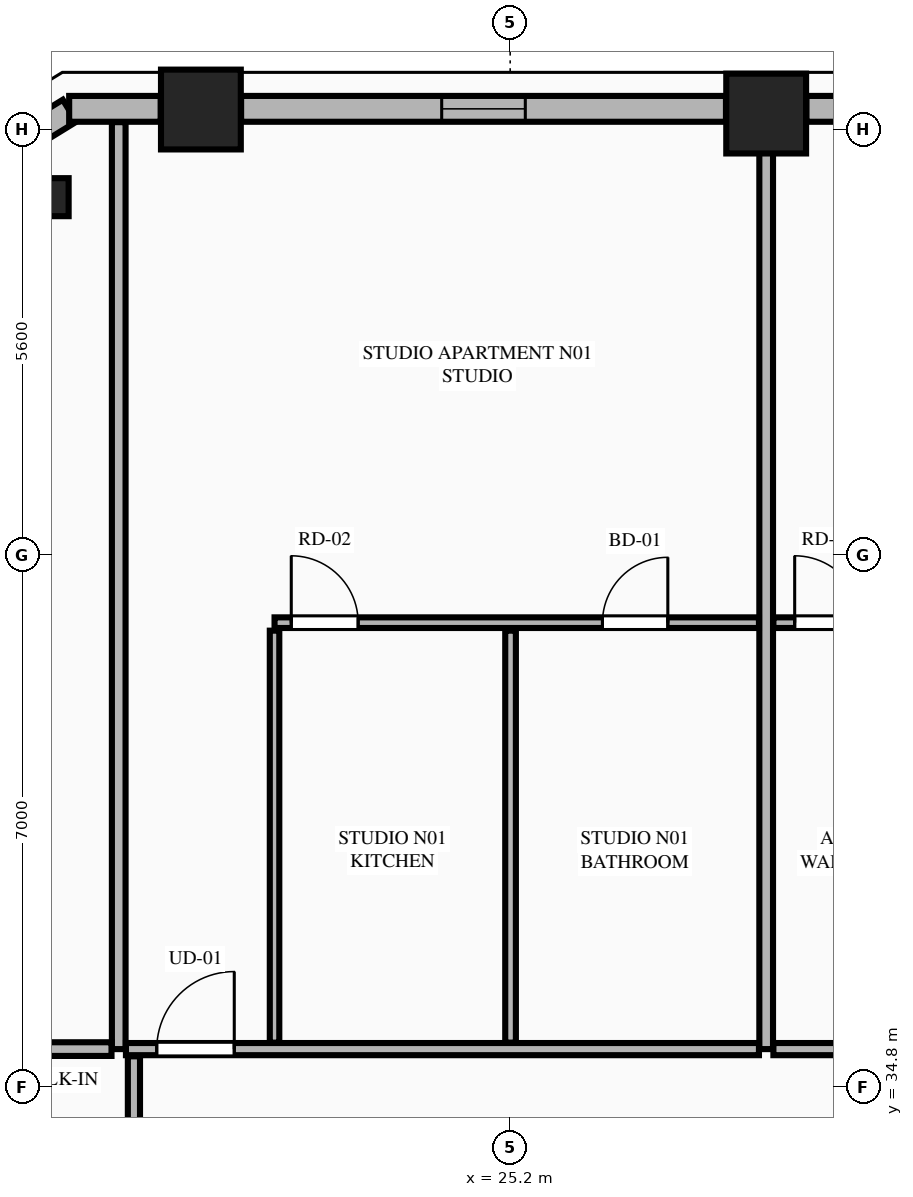
"""IFC4 building model, lengths in metres.
Left out: names, types, materials, properties, quantities, classifications, styles, units other than length and angle.
Written with IfcOpenShell. Run it as: python <this file> out.ifc"""

import sys

from ifc_helpers import new_model, si_unit, direction, frame, frame_2d, origin, origin_2d, place, context, subcontext, project, spatial, rectangle, extrude, element, fill, save


model = new_model("IFC4")
c1 = context("Model", 3, precision=1e-05, world=origin(), true_north=direction((0.0, 1.0)))
c2 = subcontext(c1, "Body", "Model", "MODEL_VIEW")
j1 = project(units=[si_unit("LENGTHUNIT", "METRE"), si_unit("PLANEANGLEUNIT", "RADIAN")], contexts=[c1])
p1 = place(None, origin())
s1 = spatial("IfcSite", under=j1, at=p1, CompositionType="ELEMENT")
p2 = place(p1, origin())
s2 = spatial("IfcBuilding", under=s1, at=p2, CompositionType="ELEMENT")
p3 = place(p2, frame((0.0, 0.0, 101.95)))
s3 = spatial("IfcBuildingStorey", under=s2, at=p3, CompositionType="ELEMENT", Elevation=101.95)
for number, where, z_axis, x_axis in (
    (1, (28.568, 47.608, 0.0), (0.0, 0.0, 1.0), (1.0, 0.0, 0.0)),
    (2, (21.131, 47.661, 0.0), (0.0, 0.0, 1.0), (1.0, 0.0, 0.0)),
):
    element("IfcColumn", number, at=place(p3, frame(where, z_axis=z_axis, x_axis=x_axis)), inside=s3, PredefinedType="COLUMN", context=c2, shape_type="SweptSolid", body=[
        extrude(rectangle(XDim=1.05, YDim=1.05, at=origin_2d()), origin(), (0.0, 0.0, 1.0), 3.55),
    ])
p4 = place(p3, frame((19.141, 46.508, 0.0), z_axis=(0.0, 0.0, 1.0), x_axis=(-0.865160173452, -0.501495637342, 0.0)))
e3 = element("IfcColumn", 3, at=p4, inside=s3, PredefinedType="PILASTER", context=c2, shape_type="SweptSolid", body=[
    extrude(rectangle(XDim=0.5, YDim=0.35, at=origin_2d()), origin(), (0.0, 0.0, 1.0), 3.55),
])
p5 = place(p3, frame((19.403, 47.645, 0.0), z_axis=(0.0, 0.0, 1.0), x_axis=(-0.851798915137, -0.523868884523, 0.0)))
e4 = element("IfcWall", 4, at=p5, inside=s3, PredefinedType="STANDARD", context=c2, shape_type="SweptSolid", body=[
    extrude(rectangle(XDim=1.848, YDim=0.34, at=frame_2d((0.924, 0.0))), origin(), (0.0, 0.0, 1.0), 3.34),
])
p6 = place(p3, frame((35.703, 47.67, 0.0), z_axis=(0.0, 0.0, 1.0), x_axis=(-1.0, 0.0, 0.0)))
e5 = element("IfcWall", 5, at=p6, inside=s3, PredefinedType="STANDARD", context=c2, shape_type="SweptSolid", body=[
    extrude(rectangle(XDim=6.606, YDim=0.34, at=frame_2d((3.303, 0.0))), origin(), (0.0, 0.0, 1.0), 2.797),
])
p7 = place(p6, frame((0.22, 0.0, 0.75)))
e6 = element("IfcOpeningElement", 6, at=p7, cuts=e5, PredefinedType="OPENING", context=c2, shape_type="SweptSolid", body=[
    extrude(rectangle(XDim=1.04, YDim=1.897, at=frame_2d((0.52, 0.948))), frame((0.0, 0.18, 0.0), z_axis=(0.0, -1.0, 0.0), x_axis=(1.0, 0.0, 0.0)), (0.0, 0.0, 1.0), 0.36),
])
p8 = place(p6, frame((3.605, 0.0, 0.75)))
e7 = element("IfcOpeningElement", 7, at=p8, cuts=e5, PredefinedType="OPENING", context=c2, shape_type="SweptSolid", body=[
    extrude(rectangle(XDim=1.1, YDim=1.897, at=frame_2d((0.55, 0.948))), frame((0.0, 0.18, 0.0), z_axis=(0.0, -1.0, 0.0), x_axis=(1.0, 0.0, 0.0)), (0.0, 0.0, 1.0), 0.36),
])
p9 = place(p3, frame((28.039, 47.67, 0.0), z_axis=(0.0, 0.0, 1.0), x_axis=(-1.0, 0.0, 0.0)))
e8 = element("IfcWall", 8, at=p9, inside=s3, PredefinedType="STANDARD", context=c2, shape_type="SweptSolid", body=[
    extrude(rectangle(XDim=6.379, YDim=0.34, at=frame_2d((3.189, 0.0))), origin(), (0.0, 0.0, 1.0), 2.797),
])
p10 = place(p9, frame((2.64, 0.0, 0.75)))
e9 = element("IfcOpeningElement", 9, at=p10, cuts=e8, PredefinedType="OPENING", context=c2, shape_type="SweptSolid", body=[
    extrude(rectangle(XDim=1.1, YDim=1.897, at=frame_2d((0.55, 0.948))), frame((0.0, 0.18, 0.0), z_axis=(0.0, -1.0, 0.0), x_axis=(1.0, 0.0, 0.0)), (0.0, 0.0, 1.0), 0.36),
])
p11 = place(p3, frame((20.602, 47.67, 0.0), z_axis=(0.0, 0.0, 1.0), x_axis=(-1.0, 0.0, 0.0)))
e10 = element("IfcWall", 10, at=p11, inside=s3, PredefinedType="STANDARD", context=c2, shape_type="SweptSolid", body=[
    extrude(rectangle(XDim=1.204, YDim=0.34, at=frame_2d((0.602, 0.0))), origin(), (0.0, 0.0, 1.0), 3.34),
])
p12 = place(p3, frame((20.05, 35.3, 0.0), z_axis=(0.0, 0.0, 1.0), x_axis=(0.0, 1.0, 0.0)))
e11 = element("IfcWall", 11, at=p12, inside=s3, PredefinedType="PARTITIONING", context=c2, shape_type="SweptSolid", body=[
    extrude(rectangle(XDim=12.195, YDim=0.18, at=frame_2d((6.098, 0.0))), origin(), (0.0, 0.0, 1.0), 3.34),
])
p13 = place(p3, frame((28.568, 35.3, 0.0), z_axis=(0.0, 0.0, 1.0), x_axis=(0.0, 1.0, 0.0)))
e12 = element("IfcWall", 12, at=p13, inside=s3, PredefinedType="PARTITIONING", context=c2, shape_type="SweptSolid", body=[
    extrude(rectangle(XDim=12.195, YDim=0.18, at=frame_2d((6.098, 0.0))), origin(), (0.0, 0.0, 1.0), 2.722),
])
p14 = place(p3, frame((20.145, 35.3, 0.0), z_axis=(0.0, 0.0, 1.0), x_axis=(1.0, 0.0, 0.0)))
e13 = element("IfcWall", 13, at=p14, inside=s3, PredefinedType="PARTITIONING", context=c2, shape_type="SweptSolid", body=[
    extrude(rectangle(XDim=8.328, YDim=0.16, at=frame_2d((4.164, 0.0))), origin(), (0.0, 0.0, 1.0), 3.34),
])
p15 = place(p14, frame((0.405, 0.0, 0.0)))
e14 = element("IfcOpeningElement", 14, at=p15, cuts=e13, PredefinedType="OPENING", context=c2, shape_type="SweptSolid", body=[
    extrude(rectangle(XDim=1.02, YDim=2.25, at=frame_2d((0.51, 1.125))), frame((0.0, 0.09, 0.0), z_axis=(0.0, -1.0, 0.0), x_axis=(1.0, 0.0, 0.0)), (0.0, 0.0, 1.0), 0.18),
])
p16 = place(p3, frame((22.1, 35.385, 0.0), z_axis=(0.0, 0.0, 1.0), x_axis=(0.0, 1.0, 0.0)))
e15 = element("IfcWall", 15, at=p16, inside=s3, PredefinedType="PARTITIONING", context=c2, shape_type="SweptSolid", body=[
    extrude(rectangle(XDim=5.42, YDim=0.125, at=frame_2d((2.71, 0.0))), origin(), (0.0, 0.0, 1.0), 2.722),
])
p17 = place(p3, frame((22.1, 40.91, 0.0), z_axis=(0.0, 0.0, 1.0), x_axis=(1.0, 0.0, 0.0)))
e16 = element("IfcWall", 16, at=p17, inside=s3, PredefinedType="PLUMBINGWALL", context=c2, shape_type="SweptSolid", body=[
    extrude(rectangle(XDim=6.373, YDim=0.14, at=frame_2d((3.187, 0.0))), origin(), (0.0, 0.0, 1.0), 3.34),
])
p18 = place(p17, frame((4.314, 0.0, 0.0)))
e17 = element("IfcOpeningElement", 17, at=p18, cuts=e16, PredefinedType="OPENING", context=c2, shape_type="SweptSolid", body=[
    extrude(rectangle(XDim=0.86, YDim=2.1, at=frame_2d((0.43, 1.05))), frame((0.0, 0.08, 0.0), z_axis=(0.0, -1.0, 0.0), x_axis=(1.0, 0.0, 0.0)), (0.0, 0.0, 1.0), 0.16),
])
p19 = place(p17, frame((0.22, 0.0, 0.0)))
e18 = element("IfcOpeningElement", 18, at=p19, cuts=e16, PredefinedType="OPENING", context=c2, shape_type="SweptSolid", body=[
    extrude(rectangle(XDim=0.88, YDim=2.15, at=frame_2d((0.44, 1.075))), frame((0.0, 0.08, 0.0), z_axis=(0.0, -1.0, 0.0), x_axis=(1.0, 0.0, 0.0)), (0.0, 0.0, 1.0), 0.16),
])
p20 = place(p3, frame((25.205, 35.385, 0.0), z_axis=(0.0, 0.0, 1.0), x_axis=(0.0, 1.0, 0.0)))
e19 = element("IfcWall", 19, at=p20, inside=s3, PredefinedType="PLUMBINGWALL", context=c2, shape_type="SweptSolid", body=[
    extrude(rectangle(XDim=5.42, YDim=0.14, at=frame_2d((2.71, 0.0))), origin(), (0.0, 0.0, 1.0), 3.34),
])
p21 = place(p3, frame((28.663, 35.3, 0.0), z_axis=(0.0, 0.0, 1.0), x_axis=(1.0, 0.0, 0.0)))
e20 = element("IfcWall", 20, at=p21, inside=s3, PredefinedType="PARTITIONING", context=c2, shape_type="SweptSolid", body=[
    extrude(rectangle(XDim=15.992, YDim=0.16, at=frame_2d((7.996, 0.0))), origin(), (0.0, 0.0, 1.0), 3.34),
])
p22 = place(p21, frame((14.087, 0.0, 0.0)))
e21 = element("IfcOpeningElement", 21, at=p22, cuts=e20, PredefinedType="OPENING", context=c2, shape_type="SweptSolid", body=[
    extrude(rectangle(XDim=1.02, YDim=2.25, at=frame_2d((0.51, 1.125))), frame((0.0, 0.09, 0.0), z_axis=(0.0, -1.0, 0.0), x_axis=(1.0, 0.0, 0.0)), (0.0, 0.0, 1.0), 0.18),
])
p23 = place(p3, frame((28.663, 40.91, 0.0), z_axis=(0.0, 0.0, 1.0), x_axis=(1.0, 0.0, 0.0)))
e22 = element("IfcWall", 22, at=p23, inside=s3, PredefinedType="PLUMBINGWALL", context=c2, shape_type="SweptSolid", body=[
    extrude(rectangle(XDim=5.373, YDim=0.14, at=frame_2d((2.687, 0.0))), origin(), (0.0, 0.0, 1.0), 3.34),
])
p24 = place(p23, frame((0.28, 0.0, 0.0)))
e23 = element("IfcOpeningElement", 23, at=p24, cuts=e22, PredefinedType="OPENING", context=c2, shape_type="SweptSolid", body=[
    extrude(rectangle(XDim=0.88, YDim=2.15, at=frame_2d((0.44, 1.075))), frame((0.0, 0.08, 0.0), z_axis=(0.0, -1.0, 0.0), x_axis=(1.0, 0.0, 0.0)), (0.0, 0.0, 1.0), 0.16),
])
p25 = place(p23, frame((3.543, 0.0, 0.0)))
e24 = element("IfcOpeningElement", 24, at=p25, cuts=e22, PredefinedType="OPENING", context=c2, shape_type="SweptSolid", body=[
    extrude(rectangle(XDim=0.86, YDim=2.1, at=frame_2d((0.43, 1.05))), frame((0.0, 0.08, 0.0), z_axis=(0.0, -1.0, 0.0), x_axis=(1.0, 0.0, 0.0)), (0.0, 0.0, 1.0), 0.16),
])
p26 = place(p3, frame((12.286, 35.3, 0.0), z_axis=(0.0, 0.0, 1.0), x_axis=(1.0, 0.0, 0.0)))
e25 = element("IfcWall", 25, at=p26, inside=s3, PredefinedType="PARTITIONING", context=c2, shape_type="SweptSolid", body=[
    extrude(rectangle(XDim=7.669, YDim=0.18, at=frame_2d((3.834, 0.0))), origin(), (0.0, 0.0, 1.0), 3.34),
])
p27 = place(p3, frame((20.25, 16.595, 0.0), z_axis=(0.0, 0.0, 1.0), x_axis=(0.0, 1.0, 0.0)))
e26 = element("IfcWall", 26, at=p27, inside=s3, PredefinedType="PARTITIONING", context=c2, shape_type="SweptSolid", body=[
    extrude(rectangle(XDim=18.61, YDim=0.16, at=frame_2d((9.305, 0.0))), origin(), (0.0, 0.0, 1.0), 3.34),
])
p28 = place(p27, frame((0.45, 0.0, 0.0)))
e27 = element("IfcOpeningElement", 27, at=p28, cuts=e26, PredefinedType="OPENING", context=c2, shape_type="SweptSolid", body=[
    extrude(rectangle(XDim=1.02, YDim=2.25, at=frame_2d((0.51, 1.125))), frame((0.0, 0.09, 0.0), z_axis=(0.0, -1.0, 0.0), x_axis=(1.0, 0.0, 0.0)), (0.0, 0.0, 1.0), 0.18),
])
p29 = place(p10, origin())
e28 = element("IfcWindow", 28, at=p29, inside=s3, PartitioningType="SINGLE_PANEL", PredefinedType="WINDOW", context=c2, shape_type="SweptSolid", body=[
    extrude(rectangle(XDim=1.1, YDim=1.897, at=frame_2d((0.55, 0.948))), frame((0.0, 0.03, 0.0), z_axis=(0.0, -1.0, 0.0), x_axis=(1.0, 0.0, 0.0)), (0.0, 0.0, 1.0), 0.06),
])
fill(e9, e28)
p30 = place(p18, origin())
e29 = element("IfcDoor", 29, at=p30, inside=s3, OperationType="SINGLE_SWING_RIGHT", PredefinedType="DOOR", context=c2, shape_type="SweptSolid", body=[
    extrude(rectangle(XDim=0.86, YDim=2.1, at=frame_2d((0.43, 1.05))), frame((0.0, 0.025, 0.0), z_axis=(0.0, -1.0, 0.0), x_axis=(1.0, 0.0, 0.0)), (0.0, 0.0, 1.0), 0.05),
])
fill(e17, e29)
p31 = place(p15, origin())
e30 = element("IfcDoor", 30, at=p31, inside=s3, OperationType="SINGLE_SWING_RIGHT", PredefinedType="DOOR", context=c2, shape_type="SweptSolid", body=[
    extrude(rectangle(XDim=1.02, YDim=2.25, at=frame_2d((0.51, 1.125))), frame((0.0, 0.025, 0.0), z_axis=(0.0, -1.0, 0.0), x_axis=(1.0, 0.0, 0.0)), (0.0, 0.0, 1.0), 0.05),
])
fill(e14, e30)
p32 = place(p19, origin())
e31 = element("IfcDoor", 31, at=p32, inside=s3, OperationType="SINGLE_SWING_LEFT", PredefinedType="DOOR", context=c2, shape_type="SweptSolid", body=[
    extrude(rectangle(XDim=0.88, YDim=2.15, at=frame_2d((0.44, 1.075))), frame((0.0, 0.025, 0.0), z_axis=(0.0, -1.0, 0.0), x_axis=(1.0, 0.0, 0.0)), (0.0, 0.0, 1.0), 0.05),
])
fill(e18, e31)
p33 = place(p24, origin())
e32 = element("IfcDoor", 32, at=p33, inside=s3, OperationType="SINGLE_SWING_LEFT", PredefinedType="DOOR", context=c2, shape_type="SweptSolid", body=[
    extrude(rectangle(XDim=0.88, YDim=2.15, at=frame_2d((0.44, 1.075))), frame((0.0, 0.025, 0.0), z_axis=(0.0, -1.0, 0.0), x_axis=(1.0, 0.0, 0.0)), (0.0, 0.0, 1.0), 0.05),
])
fill(e23, e32)
save(model, sys.argv[1])
